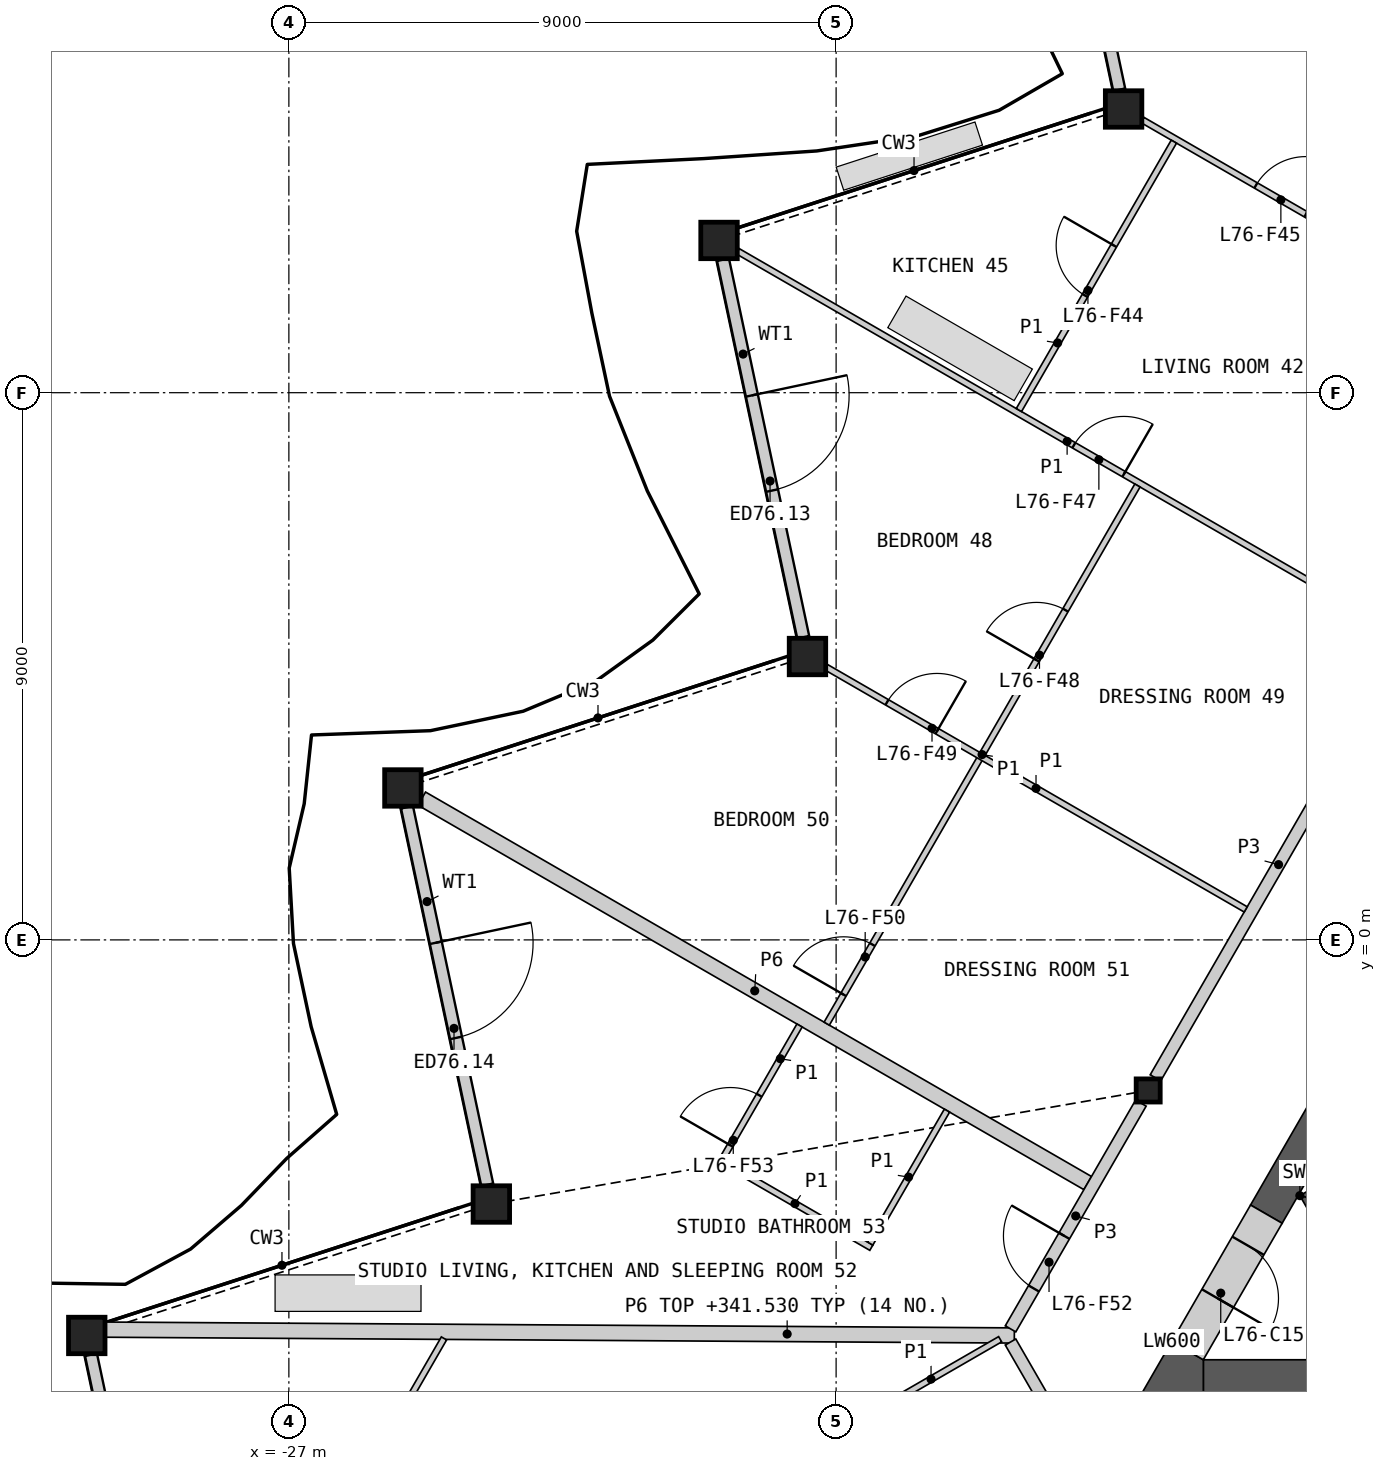
"""IFC4 building model, lengths in metres.
Left out: names, types, materials, properties, quantities, classifications, styles, units other than length and angle.
Written with IfcOpenShell. Run it as: python <this file> out.ifc"""

import sys

from ifc_helpers import new_model, si_unit, direction, frame, frame_2d, origin, origin_2d, place, context, subcontext, project, spatial, polyline, rectangle, hollow_rectangle, i_section, outline, extrude, element, fill, save


model = new_model("IFC4")
c1 = context("Model", 3, precision=1e-05, world=origin(), true_north=direction((0.0, 1.0)))
c2 = subcontext(c1, "Body", "Model", "MODEL_VIEW")
j1 = project(units=[si_unit("LENGTHUNIT", "METRE"), si_unit("PLANEANGLEUNIT", "RADIAN")], contexts=[c1])
p1 = place(None, origin())
s1 = spatial("IfcSite", under=j1, at=p1, CompositionType="ELEMENT")
p2 = place(p1, origin())
s2 = spatial("IfcBuilding", under=s1, at=p2, CompositionType="ELEMENT")
p3 = place(p2, frame((0.0, 0.0, 339.2)))
s3 = spatial("IfcBuildingStorey", under=s2, at=p3, CompositionType="ELEMENT", Elevation=339.2)
for number, where, z_axis, x_axis in (
    (1, (-13.272, 13.666, 0.0), (0.0, 0.0, 1.0), (1.0, 0.0, 0.0)),
    (2, (-19.926, 11.504, 0.0), (0.0, 0.0, 1.0), (1.0, 0.0, 0.0)),
    (3, (-18.471, 4.661, 0.0), (0.0, 0.0, 1.0), (1.0, 0.0, 0.0)),
    (4, (-25.125, 2.499, 0.0), (0.0, 0.0, 1.0), (1.0, 0.0, 0.0)),
    (5, (-23.67, -4.344, 0.0), (0.0, 0.0, 1.0), (1.0, 0.0, 0.0)),
    (6, (-30.324, -6.506, 0.0), (0.0, 0.0, 1.0), (1.0, 0.0, 0.0)),
):
    element("IfcColumn", number, at=place(p3, frame(where, z_axis=z_axis, x_axis=x_axis)), inside=s3, PredefinedType="COLUMN", context=c2, shape_type="SweptSolid", body=[
        extrude(hollow_rectangle(XDim=0.6, YDim=0.6, WallThickness=0.04, at=origin_2d()), origin(), (0.0, 0.0, 1.0), 3.4),
    ])
p4 = place(p3, frame((-12.868, -2.476, 0.0), z_axis=(0.0, 0.0, 1.0), x_axis=(1.0, 0.0, 0.0)))
e7 = element("IfcColumn", 7, at=p4, inside=s3, PredefinedType="COLUMN", context=c2, shape_type="SweptSolid", body=[
    extrude(i_section(OverallWidth=0.396, OverallDepth=0.381, WebThickness=0.019, FlangeThickness=0.03, at=origin_2d()), origin(), (0.0, 0.0, 1.0), 3.4),
])
p5 = place(p3, frame((-14.663, 20.192, 0.0), z_axis=(0.0, 0.0, 1.0), x_axis=(0.207897850695, -0.97815054244, 0.0)))
e8 = element("IfcWall", 8, at=p5, inside=s3, PredefinedType="SOLIDWALL", context=c2, shape_type="SweptSolid", body=[
    extrude(rectangle(XDim=6.348, YDim=0.2, at=frame_2d((3.174, 0.0))), origin(), (0.0, 0.0, 1.0), 2.488),
])
p6 = place(p5, frame((2.285, 0.0, 0.0)))
e9 = element("IfcOpeningElement", 9, at=p6, cuts=e8, PredefinedType="OPENING", context=c2, shape_type="SweptSolid", body=[
    extrude(rectangle(XDim=1.6, YDim=2.25, at=frame_2d((0.8, 1.125))), frame((0.0, 0.11, 0.0), z_axis=(0.0, -1.0, 0.0), x_axis=(1.0, 0.0, 0.0)), (0.0, 0.0, 1.0), 0.22),
])
p7 = place(p3, frame((-19.86, 11.188, 0.0), z_axis=(0.0, 0.0, 1.0), x_axis=(0.20789003057, -0.978152204511, 0.0)))
e10 = element("IfcWall", 10, at=p7, inside=s3, PredefinedType="SOLIDWALL", context=c2, shape_type="SweptSolid", body=[
    extrude(rectangle(XDim=6.349, YDim=0.2, at=frame_2d((3.174, 0.0))), origin(), (0.0, 0.0, 1.0), 2.488),
])
p8 = place(p7, frame((2.282, 0.0, 0.0)))
e11 = element("IfcOpeningElement", 11, at=p8, cuts=e10, PredefinedType="OPENING", context=c2, shape_type="SweptSolid", body=[
    extrude(rectangle(XDim=1.6, YDim=2.25, at=frame_2d((0.8, 1.125))), frame((0.0, 0.11, 0.0), z_axis=(0.0, -1.0, 0.0), x_axis=(1.0, 0.0, 0.0)), (0.0, 0.0, 1.0), 0.22),
])
p9 = place(p3, frame((-25.057, 2.182, 0.0), z_axis=(0.0, 0.0, 1.0), x_axis=(0.207926823578, -0.978144384044, 0.0)))
e12 = element("IfcWall", 12, at=p9, inside=s3, PredefinedType="SOLIDWALL", context=c2, shape_type="SweptSolid", body=[
    extrude(rectangle(XDim=6.349, YDim=0.2, at=frame_2d((3.174, 0.0))), origin(), (0.0, 0.0, 1.0), 2.488),
])
p10 = place(p9, frame((2.279, 0.0, 0.0)))
e13 = element("IfcOpeningElement", 13, at=p10, cuts=e12, PredefinedType="OPENING", context=c2, shape_type="SweptSolid", body=[
    extrude(rectangle(XDim=1.6, YDim=2.25, at=frame_2d((0.8, 1.125))), frame((0.0, 0.11, 0.0), z_axis=(0.0, -1.0, 0.0), x_axis=(1.0, 0.0, 0.0)), (0.0, 0.0, 1.0), 0.22),
])
p11 = place(p3, frame((-30.254, -6.823, 0.0), z_axis=(0.0, 0.0, 1.0), x_axis=(0.207926823578, -0.978144384044, 0.0)))
e14 = element("IfcWall", 14, at=p11, inside=s3, PredefinedType="SOLIDWALL", context=c2, shape_type="SweptSolid", body=[
    extrude(rectangle(XDim=6.349, YDim=0.2, at=frame_2d((3.174, 0.0))), origin(), (0.0, 0.0, 1.0), 2.488),
])
p12 = place(p11, frame((2.276, 0.0, 0.0)))
e15 = element("IfcOpeningElement", 15, at=p12, cuts=e14, PredefinedType="OPENING", context=c2, shape_type="SweptSolid", body=[
    extrude(rectangle(XDim=1.6, YDim=2.25, at=frame_2d((0.8, 1.125))), frame((0.0, 0.11, 0.0), z_axis=(0.0, -1.0, 0.0), x_axis=(1.0, 0.0, 0.0)), (0.0, 0.0, 1.0), 0.22),
])
p13 = place(p3, origin())
e16 = element("IfcWall", 16, at=p13, inside=s3, PredefinedType="SHEAR", context=c2, shape_type="SweptSolid", body=[
    extrude(outline(polyline([(-5.307, -1.281), (-10.374, -4.206), (-10.032, -4.298), (-5.182, -1.498), (-5.307, -1.281)])), origin(), (0.0, 0.0, 1.0), 3.1),
])
p14 = place(p3, origin())
e17 = element("IfcWall", 17, at=p14, inside=s3, PredefinedType="SHEAR", context=c2, shape_type="SweptSolid", body=[
    extrude(outline(polyline([(-10.374, -4.206), (-8.83, -6.881), (-8.738, -6.539), (-10.032, -4.298), (-10.374, -4.206)])), origin(), (0.0, 0.0, 1.0), 3.1),
])
p15 = place(p3, frame((-11.961, -7.206, 0.0), z_axis=(0.0, 0.0, 1.0), x_axis=(1.0, 0.0, 0.0)))
e18 = element("IfcWall", 18, at=p15, inside=s3, PredefinedType="SHEAR", context=c2, shape_type="SweptSolid", body=[
    extrude(rectangle(XDim=23.921, YDim=0.6, at=frame_2d((11.961, 0.0))), origin(), (0.0, 0.0, 1.0), 3.1),
])
p16 = place(p3, frame((-8.44, -0.208, 0.0), z_axis=(0.0, 0.0, 1.0), x_axis=(-0.500007425856, -0.866021116422, 0.0)))
e19 = element("IfcWall", 19, at=p16, inside=s3, PredefinedType="SHEAR", context=c2, shape_type="SweptSolid", body=[
    extrude(rectangle(XDim=4.969, YDim=0.6, at=frame_2d((2.484, 0.0))), origin(), (0.0, 0.0, 1.0), 3.1),
])
p17 = place(p3, origin())
e20 = element("IfcWall", 20, at=p17, inside=s3, PredefinedType="SHEAR", context=c2, shape_type="SweptSolid", body=[
    extrude(outline(polyline([(-12.48, -6.606), (-11.961, -6.906), (-11.961, -7.506), (-13.0, -7.506), (-12.48, -6.606)])), origin(), (0.0, 0.0, 1.0), 3.1),
])
p18 = place(p3, frame((-10.925, -4.511, 0.0), z_axis=(0.0, 0.0, 1.0), x_axis=(-0.500018667571, -0.866014625789, 0.0)))
e21 = element("IfcWall", 21, at=p18, inside=s3, PredefinedType="SHEAR", context=c2, shape_type="SweptSolid", body=[
    extrude(rectangle(XDim=2.592, YDim=0.6, at=frame_2d((1.296, 0.0))), origin(), (0.0, 0.0, 1.0), 3.1),
])
p19 = place(p18, frame((0.6, 0.0, 0.0)))
e22 = element("IfcOpeningElement", 22, at=p19, cuts=e21, PredefinedType="OPENING", context=c2, shape_type="SweptSolid", body=[
    extrude(rectangle(XDim=1.0, YDim=2.1, at=frame_2d((0.5, 1.05))), frame((0.0, 0.31, 0.0), z_axis=(0.0, -1.0, 0.0), x_axis=(1.0, 0.0, 0.0)), (0.0, 0.0, 1.0), 0.62),
])
p20 = place(p3, frame((-30.014, -6.41, 0.0), z_axis=(0.0, 0.0, 1.0), x_axis=(0.999979286789, -0.00643630279, 0.0)))
e23 = element("IfcWall", 23, at=p20, inside=s3, PredefinedType="PARTITIONING", context=c2, shape_type="SweptSolid", body=[
    extrude(rectangle(XDim=14.945, YDim=0.25, at=frame_2d((7.473, 0.0))), origin(), (0.0, 0.0, 1.0), 2.33),
])
p21 = place(p3, frame((-24.815, 2.323, 0.0), z_axis=(0.0, 0.0, 1.0), x_axis=(0.866033203648, -0.499986489997, 0.0)))
e24 = element("IfcWall", 24, at=p21, inside=s3, PredefinedType="PARTITIONING", context=c2, shape_type="SweptSolid", body=[
    extrude(rectangle(XDim=12.646, YDim=0.25, at=frame_2d((6.323, 0.0))), origin(), (0.0, 0.0, 1.0), 2.33),
])
p22 = place(p3, frame((-12.748, -2.269, 0.0), z_axis=(0.0, 0.0, 1.0), x_axis=(0.499984266882, 0.866034487114, 0.0)))
e25 = element("IfcWall", 25, at=p22, inside=s3, PredefinedType="PARTITIONING", context=c2, shape_type="SweptSolid", body=[
    extrude(rectangle(XDim=8.099, YDim=0.2, at=frame_2d((4.049, 0.0))), origin(), (0.0, 0.0, 1.0), 3.1),
])
p23 = place(p3, frame((-15.131, -6.397, 0.0), z_axis=(0.0, 0.0, 1.0), x_axis=(0.500003406062, 0.866023437285, 0.0)))
e26 = element("IfcWall", 26, at=p23, inside=s3, PredefinedType="PARTITIONING", context=c2, shape_type="SweptSolid", body=[
    extrude(rectangle(XDim=4.288, YDim=0.2, at=frame_2d((2.144, 0.0))), origin(), (0.0, 0.0, 1.0), 3.1),
])
p24 = place(p23, frame((0.766, 0.0, 0.0)))
e27 = element("IfcOpeningElement", 27, at=p24, cuts=e26, PredefinedType="OPENING", context=c2, shape_type="SweptSolid", body=[
    extrude(rectangle(XDim=1.0, YDim=2.1, at=frame_2d((0.5, 1.05))), frame((0.0, 0.11, 0.0), z_axis=(0.0, -1.0, 0.0), x_axis=(1.0, 0.0, 0.0)), (0.0, 0.0, 1.0), 0.22),
])
p25 = place(p3, frame((-15.131, -6.614, 0.0), z_axis=(0.0, 0.0, 1.0), x_axis=(0.499967746641, -0.866044024469, 0.0)))
e28 = element("IfcWall", 28, at=p25, inside=s3, PredefinedType="PARTITIONING", context=c2, shape_type="SweptSolid", body=[
    extrude(rectangle(XDim=3.676, YDim=0.2, at=frame_2d((1.838, 0.0))), origin(), (0.0, 0.0, 1.0), 3.1),
])
p26 = place(p25, frame((2.426, 0.0, 0.0)))
e29 = element("IfcOpeningElement", 29, at=p26, cuts=e28, PredefinedType="OPENING", context=c2, shape_type="SweptSolid", body=[
    extrude(rectangle(XDim=1.0, YDim=2.1, at=frame_2d((0.5, 1.05))), frame((0.0, 0.11, 0.0), z_axis=(0.0, -1.0, 0.0), x_axis=(1.0, 0.0, 0.0)), (0.0, 0.0, 1.0), 0.22),
])
p27 = place(p3, frame((-19.615, 11.325, 0.0), z_axis=(0.0, 0.0, 1.0), x_axis=(0.86602139559, -0.500006942333, 0.0)))
e30 = element("IfcWall", 30, at=p27, inside=s3, PredefinedType="PARTITIONING", context=c2, shape_type="SweptSolid", body=[
    extrude(rectangle(XDim=12.505, YDim=0.1, at=frame_2d((6.252, 0.0))), origin(), (0.0, 0.0, 1.0), 2.33),
])
p28 = place(p27, frame((6.38, 0.0, 0.0)))
e31 = element("IfcOpeningElement", 31, at=p28, cuts=e30, PredefinedType="OPENING", context=c2, shape_type="SweptSolid", body=[
    extrude(rectangle(XDim=0.95, YDim=2.1, at=frame_2d((0.475, 1.05))), frame((0.0, 0.06, 0.0), z_axis=(0.0, -1.0, 0.0), x_axis=(1.0, 0.0, 0.0)), (0.0, 0.0, 1.0), 0.12),
])
p29 = place(p3, frame((-18.154, -1.377, 0.0), z_axis=(0.0, 0.0, 1.0), x_axis=(0.49998782916, 0.866032430508, 0.0)))
e32 = element("IfcWall", 32, at=p29, inside=s3, PredefinedType="PARTITIONING", context=c2, shape_type="SweptSolid", body=[
    extrude(rectangle(XDim=10.22, YDim=0.1, at=frame_2d((5.11, 0.0))), origin(), (0.0, 0.0, 1.0), 2.33),
])
p30 = place(p29, frame((6.903, 0.0, 0.0)))
e33 = element("IfcOpeningElement", 33, at=p30, cuts=e32, PredefinedType="OPENING", context=c2, shape_type="SweptSolid", body=[
    extrude(rectangle(XDim=0.95, YDim=2.1, at=frame_2d((0.475, 1.05))), frame((0.0, 0.06, 0.0), z_axis=(0.0, -1.0, 0.0), x_axis=(1.0, 0.0, 0.0)), (0.0, 0.0, 1.0), 0.12),
])
p31 = place(p29, frame((0.552, 0.0, 0.0)))
e34 = element("IfcOpeningElement", 34, at=p31, cuts=e32, PredefinedType="OPENING", context=c2, shape_type="SweptSolid", body=[
    extrude(rectangle(XDim=0.95, YDim=2.1, at=frame_2d((0.475, 1.05))), frame((0.0, 0.06, 0.0), z_axis=(0.0, -1.0, 0.0), x_axis=(1.0, 0.0, 0.0)), (0.0, 0.0, 1.0), 0.12),
])
p32 = place(p3, frame((-18.161, 4.484, 0.0), z_axis=(0.0, 0.0, 1.0), x_axis=(0.86602732995, -0.499996663769, 0.0)))
e35 = element("IfcWall", 35, at=p32, inside=s3, PredefinedType="PARTITIONING", context=c2, shape_type="SweptSolid", body=[
    extrude(rectangle(XDim=7.964, YDim=0.1, at=frame_2d((3.982, 0.0))), origin(), (0.0, 0.0, 1.0), 2.33),
])
p33 = place(p32, frame((1.152, 0.0, 0.0)))
e36 = element("IfcOpeningElement", 36, at=p33, cuts=e35, PredefinedType="OPENING", context=c2, shape_type="SweptSolid", body=[
    extrude(rectangle(XDim=0.95, YDim=2.1, at=frame_2d((0.475, 1.05))), frame((0.0, 0.06, 0.0), z_axis=(0.0, -1.0, 0.0), x_axis=(1.0, 0.0, 0.0)), (0.0, 0.0, 1.0), 0.12),
])
p34 = place(p3, frame((-12.962, 13.485, 0.0), z_axis=(0.0, 0.0, 1.0), x_axis=(0.866021168401, -0.500007335828, 0.0)))
e37 = element("IfcWall", 37, at=p34, inside=s3, PredefinedType="PARTITIONING", context=c2, shape_type="SweptSolid", body=[
    extrude(rectangle(XDim=7.962, YDim=0.1, at=frame_2d((3.981, 0.0))), origin(), (0.0, 0.0, 1.0), 2.33),
])
p35 = place(p34, frame((2.154, 0.0, 0.0)))
e38 = element("IfcOpeningElement", 38, at=p35, cuts=e37, PredefinedType="OPENING", context=c2, shape_type="SweptSolid", body=[
    extrude(rectangle(XDim=0.95, YDim=2.1, at=frame_2d((0.475, 1.05))), frame((0.0, 0.06, 0.0), z_axis=(0.0, -1.0, 0.0), x_axis=(1.0, 0.0, 0.0)), (0.0, 0.0, 1.0), 0.12),
])
p36 = place(p3, frame((-14.994, 8.714, 0.0), z_axis=(0.0, 0.0, 1.0), x_axis=(0.500012659481, 0.866018094706, 0.0)))
e39 = element("IfcWall", 39, at=p36, inside=s3, PredefinedType="PARTITIONING", context=c2, shape_type="SweptSolid", body=[
    extrude(rectangle(XDim=5.097, YDim=0.1, at=frame_2d((2.549, 0.0))), origin(), (0.0, 0.0, 1.0), 2.33),
])
p37 = place(p36, frame((2.175, 0.0, 0.0)))
e40 = element("IfcOpeningElement", 40, at=p37, cuts=e39, PredefinedType="OPENING", context=c2, shape_type="SweptSolid", body=[
    extrude(rectangle(XDim=0.95, YDim=2.1, at=frame_2d((0.475, 1.05))), frame((0.0, 0.06, 0.0), z_axis=(0.0, -1.0, 0.0), x_axis=(1.0, 0.0, 0.0)), (0.0, 0.0, 1.0), 0.12),
])
p38 = place(p3, frame((-26.619, -10.312, 0.0), z_axis=(0.0, 0.0, 1.0), x_axis=(0.500060114735, 0.865990693744, 0.0)))
e41 = element("IfcWall", 41, at=p38, inside=s3, PredefinedType="PARTITIONING", context=c2, shape_type="SweptSolid", body=[
    extrude(rectangle(XDim=4.339, YDim=0.1, at=frame_2d((2.17, 0.0))), origin(), (0.0, 0.0, 1.0), 2.33),
])
p39 = place(p38, frame((0.663, 0.0, 0.0)))
e42 = element("IfcOpeningElement", 42, at=p39, cuts=e41, PredefinedType="OPENING", context=c2, shape_type="SweptSolid", body=[
    extrude(rectangle(XDim=0.95, YDim=2.1, at=frame_2d((0.475, 1.05))), frame((0.0, 0.06, 0.0), z_axis=(0.0, -1.0, 0.0), x_axis=(1.0, 0.0, 0.0)), (0.0, 0.0, 1.0), 0.12),
])
p40 = place(p3, frame((-19.932, -3.613, 0.0), z_axis=(0.0, 0.0, 1.0), x_axis=(0.865996321171, -0.50005036918, 0.0)))
e43 = element("IfcWall", 43, at=p40, inside=s3, PredefinedType="PARTITIONING", context=c2, shape_type="SweptSolid", body=[
    extrude(rectangle(XDim=2.9, YDim=0.1, at=frame_2d((1.45, 0.0))), origin(), (0.0, 0.0, 1.0), 2.33),
])
p41 = place(p3, frame((-17.439, -4.995, 0.0), z_axis=(0.0, 0.0, 1.0), x_axis=(0.499976333282, 0.866039067339, 0.0)))
e44 = element("IfcWall", 44, at=p41, inside=s3, PredefinedType="PARTITIONING", context=c2, shape_type="SweptSolid", body=[
    extrude(rectangle(XDim=2.525, YDim=0.1, at=frame_2d((1.262, 0.0))), origin(), (0.0, 0.0, 1.0), 2.33),
])
p42 = place(p3, frame((-19.864, -3.594, 0.0), z_axis=(0.0, 0.0, 1.0), x_axis=(0.50001820224, 0.866014894461, 0.0)))
e45 = element("IfcWall", 45, at=p42, inside=s3, PredefinedType="PARTITIONING", context=c2, shape_type="SweptSolid", body=[
    extrude(rectangle(XDim=2.525, YDim=0.1, at=frame_2d((1.262, 0.0))), origin(), (0.0, 0.0, 1.0), 2.33),
])
p43 = place(p42, frame((0.25, 0.0, 0.0)))
e46 = element("IfcOpeningElement", 46, at=p43, cuts=e45, PredefinedType="OPENING", context=c2, shape_type="SweptSolid", body=[
    extrude(rectangle(XDim=0.95, YDim=2.1, at=frame_2d((0.475, 1.05))), frame((0.0, 0.06, 0.0), z_axis=(0.0, -1.0, 0.0), x_axis=(1.0, 0.0, 0.0)), (0.0, 0.0, 1.0), 0.12),
])
p44 = place(p3, frame((-17.575, -7.881, 0.0), z_axis=(0.0, 0.0, 1.0), x_axis=(0.866013657776, 0.500020344131, 0.0)))
e47 = element("IfcWall", 47, at=p44, inside=s3, PredefinedType="PARTITIONING", context=c2, shape_type="SweptSolid", body=[
    extrude(rectangle(XDim=2.625, YDim=0.1, at=frame_2d((1.312, 0.0))), origin(), (0.0, 0.0, 1.0), 2.33),
])
p45 = place(p8, origin())
e48 = element("IfcDoor", 48, at=p45, inside=s3, OperationType="DOUBLE_DOOR_SINGLE_SWING", PredefinedType="DOOR", context=c2, shape_type="SweptSolid", body=[
    extrude(rectangle(XDim=1.6, YDim=2.25, at=frame_2d((0.8, 1.125))), frame((0.0, 0.025, 0.0), z_axis=(0.0, -1.0, 0.0), x_axis=(1.0, 0.0, 0.0)), (0.0, 0.0, 1.0), 0.05),
])
fill(e11, e48)
p46 = place(p10, origin())
e49 = element("IfcDoor", 49, at=p46, inside=s3, OperationType="DOUBLE_DOOR_SINGLE_SWING", PredefinedType="DOOR", context=c2, shape_type="SweptSolid", body=[
    extrude(rectangle(XDim=1.6, YDim=2.25, at=frame_2d((0.8, 1.125))), frame((0.0, 0.025, 0.0), z_axis=(0.0, -1.0, 0.0), x_axis=(1.0, 0.0, 0.0)), (0.0, 0.0, 1.0), 0.05),
])
fill(e13, e49)
p47 = place(p19, origin())
e50 = element("IfcDoor", 50, at=p47, inside=s3, OperationType="SINGLE_SWING_RIGHT", PredefinedType="DOOR", context=c2, shape_type="SweptSolid", body=[
    extrude(rectangle(XDim=1.0, YDim=2.1, at=frame_2d((0.5, 1.05))), frame((0.0, 0.055, 0.0), z_axis=(0.0, -1.0, 0.0), x_axis=(1.0, 0.0, 0.0)), (0.0, 0.0, 1.0), 0.05),
])
fill(e22, e50)
p48 = place(p37, origin())
e51 = element("IfcDoor", 51, at=p48, inside=s3, OperationType="SINGLE_SWING_RIGHT", PredefinedType="DOOR", context=c2, shape_type="SweptSolid", body=[
    extrude(rectangle(XDim=0.95, YDim=2.1, at=frame_2d((0.475, 1.05))), frame((0.0, 0.025, 0.0), z_axis=(0.0, -1.0, 0.0), x_axis=(1.0, 0.0, 0.0)), (0.0, 0.0, 1.0), 0.05),
])
fill(e40, e51)
p49 = place(p35, origin())
e52 = element("IfcDoor", 52, at=p49, inside=s3, OperationType="SINGLE_SWING_RIGHT", PredefinedType="DOOR", context=c2, shape_type="SweptSolid", body=[
    extrude(rectangle(XDim=0.95, YDim=2.1, at=frame_2d((0.475, 1.05))), frame((0.0, 0.025, 0.0), z_axis=(0.0, -1.0, 0.0), x_axis=(1.0, 0.0, 0.0)), (0.0, 0.0, 1.0), 0.05),
])
fill(e38, e52)
p50 = place(p28, origin())
e53 = element("IfcDoor", 53, at=p50, inside=s3, OperationType="SINGLE_SWING_RIGHT", PredefinedType="DOOR", context=c2, shape_type="SweptSolid", body=[
    extrude(rectangle(XDim=0.95, YDim=2.1, at=frame_2d((0.475, 1.05))), frame((0.0, 0.025, 0.0), z_axis=(0.0, -1.0, 0.0), x_axis=(1.0, 0.0, 0.0)), (0.0, 0.0, 1.0), 0.05),
])
fill(e31, e53)
p51 = place(p30, origin())
e54 = element("IfcDoor", 54, at=p51, inside=s3, OperationType="SINGLE_SWING_LEFT", PredefinedType="DOOR", context=c2, shape_type="SweptSolid", body=[
    extrude(rectangle(XDim=0.95, YDim=2.1, at=frame_2d((0.475, 1.05))), frame((0.0, 0.025, 0.0), z_axis=(0.0, -1.0, 0.0), x_axis=(1.0, 0.0, 0.0)), (0.0, 0.0, 1.0), 0.05),
])
fill(e33, e54)
p52 = place(p33, origin())
e55 = element("IfcDoor", 55, at=p52, inside=s3, OperationType="SINGLE_SWING_RIGHT", PredefinedType="DOOR", context=c2, shape_type="SweptSolid", body=[
    extrude(rectangle(XDim=0.95, YDim=2.1, at=frame_2d((0.475, 1.05))), frame((0.0, 0.025, 0.0), z_axis=(0.0, -1.0, 0.0), x_axis=(1.0, 0.0, 0.0)), (0.0, 0.0, 1.0), 0.05),
])
fill(e36, e55)
p53 = place(p31, origin())
e56 = element("IfcDoor", 56, at=p53, inside=s3, OperationType="SINGLE_SWING_LEFT", PredefinedType="DOOR", context=c2, shape_type="SweptSolid", body=[
    extrude(rectangle(XDim=0.95, YDim=2.1, at=frame_2d((0.475, 1.05))), frame((0.0, 0.025, 0.0), z_axis=(0.0, -1.0, 0.0), x_axis=(1.0, 0.0, 0.0)), (0.0, 0.0, 1.0), 0.05),
])
fill(e34, e56)
p54 = place(p24, origin())
e57 = element("IfcDoor", 57, at=p54, inside=s3, OperationType="SINGLE_SWING_RIGHT", PredefinedType="DOOR", context=c2, shape_type="SweptSolid", body=[
    extrude(rectangle(XDim=1.0, YDim=2.1, at=frame_2d((0.5, 1.05))), frame((0.0, 0.025, 0.0), z_axis=(0.0, -1.0, 0.0), x_axis=(1.0, 0.0, 0.0)), (0.0, 0.0, 1.0), 0.05),
])
fill(e27, e57)
p55 = place(p43, origin())
e58 = element("IfcDoor", 58, at=p55, inside=s3, OperationType="SINGLE_SWING_LEFT", PredefinedType="DOOR", context=c2, shape_type="SweptSolid", body=[
    extrude(rectangle(XDim=0.95, YDim=2.1, at=frame_2d((0.475, 1.05))), frame((0.0, 0.025, 0.0), z_axis=(0.0, -1.0, 0.0), x_axis=(1.0, 0.0, 0.0)), (0.0, 0.0, 1.0), 0.05),
])
fill(e46, e58)
save(model, sys.argv[1])
